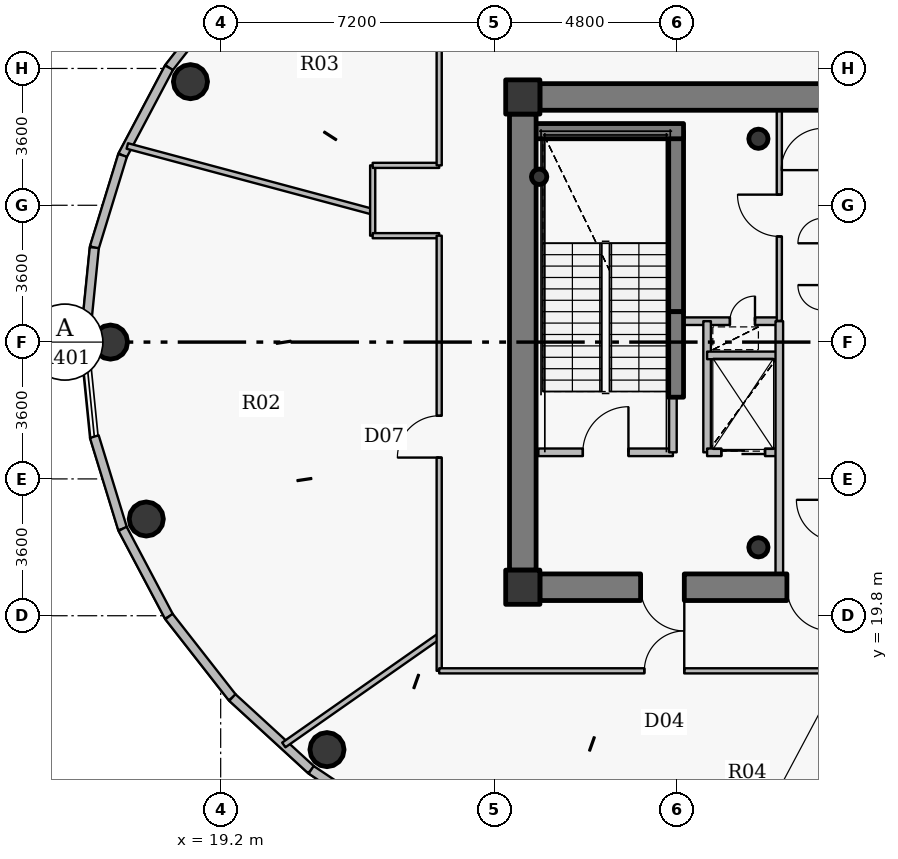
"""IFC4 building model, lengths in metres.
Left out: names, types, materials, properties, quantities, classifications, styles, units other than length and angle.
Written with IfcOpenShell. Run it as: python <this file> out.ifc"""

import sys

from ifc_helpers import new_model, si_unit, direction, frame, frame_2d, origin, origin_2d, place, context, subcontext, project, spatial, rectangle, hollow_circle, extrude, source, transform, mapped, element, fill, save


model = new_model("IFC4")
c1 = context("Model", 3, precision=1e-05, world=origin(), true_north=direction((0.0, 1.0)))
c2 = subcontext(c1, "Body", "Model", "MODEL_VIEW")
j1 = project(units=[si_unit("LENGTHUNIT", "METRE"), si_unit("PLANEANGLEUNIT", "RADIAN")], contexts=[c1])
p1 = place(None, origin())
s1 = spatial("IfcSite", under=j1, at=p1, CompositionType="ELEMENT")
p2 = place(p1, origin())
s2 = spatial("IfcBuilding", under=s1, at=p2, CompositionType="ELEMENT")
p3 = place(p2, frame((0.0, 0.0, 346.8)))
s3 = spatial("IfcBuildingStorey", under=s2, at=p3, CompositionType="ELEMENT", Elevation=346.8)
for number, where, z_axis, x_axis in (
    (1, (27.15, 20.55, 0.0), (0.0, 0.0, 1.0), (1.0, 0.0, 0.0)),
    (2, (27.15, 33.45, 0.0), (0.0, 0.0, 1.0), (1.0, 0.0, 0.0)),
):
    element("IfcColumn", number, at=place(p3, frame(where, z_axis=z_axis, x_axis=x_axis)), inside=s3, PredefinedType="COLUMN", context=c2, shape_type="SweptSolid", body=[
        extrude(rectangle(XDim=0.9, YDim=0.9, at=origin_2d()), origin(), (0.0, 0.0, 1.0), 4.2),
    ])
for number, where, z_axis, x_axis in (
    (3, (33.35, 21.6, 0.0), (0.0, 0.0, 1.0), (1.0, 0.0, 0.0)),
    (4, (33.35, 32.35, 0.0), (0.0, 0.0, 1.0), (1.0, 0.0, 0.0)),
):
    element("IfcColumn", number, at=place(p3, frame(where, z_axis=z_axis, x_axis=x_axis)), inside=s3, PredefinedType="COLUMN", context=c2, shape_type="SweptSolid", body=[
        extrude(hollow_circle(Radius=0.254, WallThickness=0.02, at=origin_2d()), origin(), (0.0, 0.0, 1.0), 4.2),
    ])
p4 = place(p3, frame((31.18, 27.8, 0.0), z_axis=(0.0, 0.0, 1.0), x_axis=(0.0, 1.0, 0.0)))
e5 = element("IfcWall", 5, at=p4, inside=s3, PredefinedType="SHEAR", context=c2, shape_type="SweptSolid", body=[
    extrude(rectangle(XDim=4.75, YDim=0.4, at=frame_2d((2.375, 0.0))), origin(), (0.0, 0.0, 1.0), 4.2),
])
p5 = place(p3, frame((27.25, 32.55, 0.0), z_axis=(0.0, 0.0, 1.0), x_axis=(1.0, 0.0, 0.0)))
e6 = element("IfcWall", 6, at=p5, inside=s3, PredefinedType="SHEAR", context=c2, shape_type="SweptSolid", body=[
    extrude(rectangle(XDim=4.13, YDim=0.4, at=frame_2d((2.065, 0.0))), origin(), (0.0, 0.0, 1.0), 4.2),
])
p6 = place(p3, frame((27.58, 31.35, 0.0), z_axis=(0.0, 0.0, 1.0), x_axis=(1.0, 0.0, 0.0)))
e7 = element("IfcColumn", 7, at=p6, inside=s3, PredefinedType="COLUMN", context=c2, shape_type="SweptSolid", body=[
    extrude(hollow_circle(Radius=0.203, WallThickness=0.016, at=origin_2d()), origin(), (0.0, 0.0, 1.0), 4.2),
])
p7 = place(p3, frame((27.6, 33.45, 0.0), z_axis=(0.0, 0.0, 1.0), x_axis=(1.0, 0.0, 0.0)))
e8 = element("IfcWall", 8, at=p7, inside=s3, PredefinedType="SHEAR", context=c2, shape_type="SweptSolid", body=[
    extrude(rectangle(XDim=16.8, YDim=0.7, at=frame_2d((8.4, 0.0))), origin(), (0.0, 0.0, 1.0), 3.45),
])
p8 = place(p7, frame((12.85, 0.0, 0.0)))
e9 = element("IfcOpeningElement", 9, at=p8, cuts=e8, PredefinedType="OPENING", context=c2, shape_type="SweptSolid", body=[
    extrude(rectangle(XDim=1.15, YDim=2.15, at=origin_2d()), frame((0.575, 0.36, 1.075), z_axis=(0.0, -1.0, 0.0), x_axis=(1.0, 0.0, 0.0)), (0.0, 0.0, 1.0), 0.72),
])
p9 = place(p3, frame((44.4, 20.55, 0.0), z_axis=(0.0, 0.0, 1.0), x_axis=(-1.0, 0.0, 0.0)))
e10 = element("IfcWall", 10, at=p9, inside=s3, PredefinedType="SHEAR", context=c2, shape_type="SweptSolid", body=[
    extrude(rectangle(XDim=16.8, YDim=0.7, at=frame_2d((8.4, 0.0))), origin(), (0.0, 0.0, 1.0), 3.45),
])
p10 = place(p9, frame((13.0, 0.0, 0.0)))
e11 = element("IfcOpeningElement", 11, at=p10, cuts=e10, PredefinedType="OPENING", context=c2, shape_type="SweptSolid", body=[
    extrude(rectangle(XDim=1.15, YDim=2.15, at=origin_2d()), frame((0.575, 0.36, 1.075), z_axis=(0.0, -1.0, 0.0), x_axis=(1.0, 0.0, 0.0)), (0.0, 0.0, 1.0), 0.72),
])
p11 = place(p9, frame((9.15, 0.0, 0.0)))
e12 = element("IfcOpeningElement", 12, at=p11, cuts=e10, PredefinedType="OPENING", context=c2, shape_type="SweptSolid", body=[
    extrude(rectangle(XDim=1.15, YDim=2.15, at=origin_2d()), frame((0.575, 0.36, 1.075), z_axis=(0.0, -1.0, 0.0), x_axis=(1.0, 0.0, 0.0)), (0.0, 0.0, 1.0), 0.72),
])
p12 = place(p3, frame((27.15, 21.0, 0.0), z_axis=(0.0, 0.0, 1.0), x_axis=(0.0, 1.0, 0.0)))
e13 = element("IfcWall", 13, at=p12, inside=s3, PredefinedType="SHEAR", context=c2, shape_type="SweptSolid", body=[
    extrude(rectangle(XDim=12.0, YDim=0.7, at=frame_2d((6.0, 0.0))), origin(), (0.0, 0.0, 1.0), 3.45),
])
p13 = place(p3, frame((31.18, 25.55, 0.0), z_axis=(0.0, 0.0, 1.0), x_axis=(0.0, 1.0, 0.0)))
e14 = element("IfcWall", 14, at=p13, inside=s3, PredefinedType="SHEAR", context=c2, shape_type="SweptSolid", body=[
    extrude(rectangle(XDim=2.25, YDim=0.4, at=frame_2d((1.125, 0.0))), origin(), (0.0, 0.0, 1.0), 3.5),
])
for number, where, z_axis, x_axis in (
    (15, (18.405, 33.853, 0.0), (0.0, 0.0, 1.0), (1.0, 0.0, 0.0)),
    (16, (16.3, 27.0, 0.0), (0.0, 0.0, 1.0), (1.0, 0.0, 0.0)),
    (17, (17.242, 22.345, 0.0), (0.0, 0.0, 1.0), (1.0, 0.0, 0.0)),
    (18, (21.998, 16.277, 0.0), (0.0, 0.0, 1.0), (1.0, 0.0, 0.0)),
):
    element("IfcColumn", number, at=place(p3, frame(where, z_axis=z_axis, x_axis=x_axis)), inside=s3, PredefinedType="COLUMN", context=c2, shape_type="SweptSolid", body=[
        extrude(hollow_circle(Radius=0.45, WallThickness=0.028, at=origin_2d()), origin(), (0.0, 0.0, 1.0), 4.2),
    ])
p14 = place(p3, frame((17.839, 34.221, 0.0), z_axis=(0.0, 0.0, 1.0), x_axis=(0.616286367698, 0.78752213492, 0.0)))
e19 = element("IfcWall", 19, at=p14, inside=s3, PredefinedType="SOLIDWALL", context=c2, shape_type="SweptSolid", body=[
    extrude(rectangle(XDim=2.706, YDim=0.24, at=frame_2d((1.353, 0.0))), origin(), (0.0, 0.0, 1.0), 3.9),
])
p15 = place(p3, frame((16.619, 31.913, 0.0), z_axis=(0.0, 0.0, 1.0), x_axis=(0.467487999989, 0.883999417345, 0.0)))
e20 = element("IfcWall", 20, at=p15, inside=s3, PredefinedType="SOLIDWALL", context=c2, shape_type="SweptSolid", body=[
    extrude(rectangle(XDim=2.61, YDim=0.24, at=frame_2d((1.305, 0.0))), origin(), (0.0, 0.0, 1.0), 3.9),
])
p16 = place(p3, frame((15.875, 29.487, 0.0), z_axis=(0.0, 0.0, 1.0), x_axis=(0.293105547213, 0.956080089842, 0.0)))
e21 = element("IfcWall", 21, at=p16, inside=s3, PredefinedType="SOLIDWALL", context=c2, shape_type="SweptSolid", body=[
    extrude(rectangle(XDim=2.538, YDim=0.24, at=frame_2d((1.269, 0.0))), origin(), (0.0, 0.0, 1.0), 3.9),
])
p17 = place(p3, frame((15.625, 27.0, 0.0), z_axis=(0.0, 0.0, 1.0), x_axis=(0.100025963401, 0.994984827344, 0.0)))
e22 = element("IfcWall", 22, at=p17, inside=s3, PredefinedType="SOLIDWALL", context=c2, shape_type="SweptSolid", body=[
    extrude(rectangle(XDim=2.499, YDim=0.24, at=frame_2d((1.25, 0.0))), origin(), (0.0, 0.0, 1.0), 3.9),
])
p18 = place(p3, frame((16.619, 22.087, 0.0), z_axis=(0.0, 0.0, 1.0), x_axis=(-0.293105547213, 0.956080089842, 0.0)))
e23 = element("IfcWall", 23, at=p18, inside=s3, PredefinedType="SOLIDWALL", context=c2, shape_type="SweptSolid", body=[
    extrude(rectangle(XDim=2.538, YDim=0.24, at=frame_2d((1.269, 0.0))), origin(), (0.0, 0.0, 1.0), 3.9),
])
p19 = place(p3, frame((17.839, 19.779, 0.0), z_axis=(0.0, 0.0, 1.0), x_axis=(-0.467487999989, 0.883999417345, 0.0)))
e24 = element("IfcWall", 24, at=p19, inside=s3, PredefinedType="SOLIDWALL", context=c2, shape_type="SweptSolid", body=[
    extrude(rectangle(XDim=2.61, YDim=0.24, at=frame_2d((1.305, 0.0))), origin(), (0.0, 0.0, 1.0), 3.9),
])
p20 = place(p3, frame((19.507, 17.648, 0.0), z_axis=(0.0, 0.0, 1.0), x_axis=(-0.616286367698, 0.78752213492, 0.0)))
e25 = element("IfcWall", 25, at=p20, inside=s3, PredefinedType="SOLIDWALL", context=c2, shape_type="SweptSolid", body=[
    extrude(rectangle(XDim=2.706, YDim=0.24, at=frame_2d((1.353, 0.0))), origin(), (0.0, 0.0, 1.0), 3.9),
])
p21 = place(p3, frame((21.581, 15.746, 0.0), z_axis=(0.0, 0.0, 1.0), x_axis=(-0.737020907932, 0.675869944051, 0.0)))
e26 = element("IfcWall", 26, at=p21, inside=s3, PredefinedType="SOLIDWALL", context=c2, shape_type="SweptSolid", body=[
    extrude(rectangle(XDim=2.815, YDim=0.24, at=frame_2d((1.407, 0.0))), origin(), (0.0, 0.0, 1.0), 3.9),
])
p22 = place(p3, frame((24.012, 14.12, 0.0), z_axis=(0.0, 0.0, 1.0), x_axis=(-0.831201688654, 0.555970999944, 0.0)))
e27 = element("IfcWall", 27, at=p22, inside=s3, PredefinedType="SOLIDWALL", context=c2, shape_type="SweptSolid", body=[
    extrude(rectangle(XDim=2.925, YDim=0.24, at=frame_2d((1.462, 0.0))), origin(), (0.0, 0.0, 1.0), 3.9),
])
p23 = place(p22, frame((0.837, 0.0, 0.9)))
e28 = element("IfcOpeningElement", 28, at=p23, cuts=e27, PredefinedType="OPENING", context=c2, shape_type="SweptSolid", body=[
    extrude(rectangle(XDim=1.25, YDim=1.65, at=origin_2d()), frame((0.625, 0.13, 0.825), z_axis=(0.0, -1.0, 0.0), x_axis=(1.0, 0.0, 0.0)), (0.0, 0.0, 1.0), 0.26),
])
p24 = place(p3, frame((16.743, 32.16, 0.0), z_axis=(0.0, 0.0, 1.0), x_axis=(0.965927509529, -0.258812763084, 0.0)))
e29 = element("IfcWall", 29, at=p24, inside=s3, PredefinedType="PARTITIONING", context=c2, shape_type="SweptSolid", body=[
    extrude(rectangle(XDim=6.684, YDim=0.15, at=frame_2d((3.342, 0.0))), origin(), (0.0, 0.0, 1.0), 3.385),
])
p25 = place(p3, frame((20.861, 16.4, 0.0), z_axis=(0.0, 0.0, 1.0), x_axis=(0.81915378735, 0.573573946994, 0.0)))
e30 = element("IfcWall", 30, at=p25, inside=s3, PredefinedType="PARTITIONING", context=c2, shape_type="SweptSolid", body=[
    extrude(rectangle(XDim=4.991, YDim=0.15, at=frame_2d((2.496, 0.0))), origin(), (0.0, 0.0, 1.0), 3.385),
])
p26 = place(p3, frame((23.2, 29.8, 0.0), z_axis=(0.0, 0.0, 1.0), x_axis=(0.0, 1.0, 0.0)))
e31 = element("IfcWall", 31, at=p26, inside=s3, PredefinedType="PARTITIONING", context=c2, shape_type="SweptSolid", body=[
    extrude(rectangle(XDim=1.85, YDim=0.135, at=frame_2d((0.925, 0.0))), origin(), (0.0, 0.0, 1.0), 3.9),
])
p27 = place(p3, frame((23.2, 29.8, 0.0), z_axis=(0.0, 0.0, 1.0), x_axis=(1.0, 0.0, 0.0)))
e32 = element("IfcWall", 32, at=p27, inside=s3, PredefinedType="PARTITIONING", context=c2, shape_type="SweptSolid", body=[
    extrude(rectangle(XDim=1.75, YDim=0.135, at=frame_2d((0.875, 0.0))), origin(), (0.0, 0.0, 1.0), 3.9),
])
p28 = place(p3, frame((23.2, 31.65, 0.0), z_axis=(0.0, 0.0, 1.0), x_axis=(1.0, 0.0, 0.0)))
e33 = element("IfcWall", 33, at=p28, inside=s3, PredefinedType="PARTITIONING", context=c2, shape_type="SweptSolid", body=[
    extrude(rectangle(XDim=1.75, YDim=0.135, at=frame_2d((0.875, 0.0))), origin(), (0.0, 0.0, 1.0), 2.685),
])
p29 = place(p3, frame((24.95, 18.35, 0.0), z_axis=(0.0, 0.0, 1.0), x_axis=(0.0, 1.0, 0.0)))
e34 = element("IfcWall", 34, at=p29, inside=s3, PredefinedType="PARTITIONING", context=c2, shape_type="SweptSolid", body=[
    extrude(rectangle(XDim=11.45, YDim=0.135, at=frame_2d((5.725, 0.0))), origin(), (0.0, 0.0, 1.0), 2.685),
])
p30 = place(p29, frame((5.611, 0.0, 0.0)))
e35 = element("IfcOpeningElement", 35, at=p30, cuts=e34, PredefinedType="OPENING", context=c2, shape_type="SweptSolid", body=[
    extrude(rectangle(XDim=1.1, YDim=2.15, at=origin_2d()), frame((0.55, 0.078, 1.075), z_axis=(0.0, -1.0, 0.0), x_axis=(1.0, 0.0, 0.0)), (0.0, 0.0, 1.0), 0.155),
])
p31 = place(p3, frame((24.95, 18.35, 0.0), z_axis=(0.0, 0.0, 1.0), x_axis=(1.0, 0.0, 0.0)))
e36 = element("IfcWall", 36, at=p31, inside=s3, PredefinedType="PARTITIONING", context=c2, shape_type="SweptSolid", body=[
    extrude(rectangle(XDim=21.195, YDim=0.135, at=frame_2d((10.597, 0.0))), origin(), (0.0, 0.0, 1.0), 2.685),
])
p32 = place(p31, frame((5.398, 0.0, 0.0)))
e37 = element("IfcOpeningElement", 37, at=p32, cuts=e36, PredefinedType="OPENING", context=c2, shape_type="SweptSolid", body=[
    extrude(rectangle(XDim=1.05, YDim=2.15, at=origin_2d()), frame((0.525, 0.078, 1.075), z_axis=(0.0, -1.0, 0.0), x_axis=(1.0, 0.0, 0.0)), (0.0, 0.0, 1.0), 0.155),
])
p33 = place(p31, frame((13.318, 0.0, 0.0)))
e38 = element("IfcOpeningElement", 38, at=p33, cuts=e36, PredefinedType="OPENING", context=c2, shape_type="SweptSolid", body=[
    extrude(rectangle(XDim=0.82, YDim=2.1, at=origin_2d()), frame((0.41, 0.078, 1.05), z_axis=(0.0, -1.0, 0.0), x_axis=(1.0, 0.0, 0.0)), (0.0, 0.0, 1.0), 0.155),
])
p34 = place(p31, frame((17.992, 0.0, 0.0)))
e39 = element("IfcOpeningElement", 39, at=p34, cuts=e36, PredefinedType="OPENING", context=c2, shape_type="SweptSolid", body=[
    extrude(rectangle(XDim=0.82, YDim=2.1, at=origin_2d()), frame((0.41, 0.078, 1.05), z_axis=(0.0, -1.0, 0.0), x_axis=(1.0, 0.0, 0.0)), (0.0, 0.0, 1.0), 0.155),
])
p35 = place(p3, frame((24.95, 31.65, 0.0), z_axis=(0.0, 0.0, 1.0), x_axis=(0.0, 1.0, 0.0)))
e40 = element("IfcWall", 40, at=p35, inside=s3, PredefinedType="PARTITIONING", context=c2, shape_type="SweptSolid", body=[
    extrude(rectangle(XDim=4.0, YDim=0.135, at=frame_2d((2.0, 0.0))), origin(), (0.0, 0.0, 1.0), 2.685),
])
p36 = place(p3, frame((27.56, 24.1, 0.0), z_axis=(0.0, 0.0, 1.0), x_axis=(1.0, 0.0, 0.0)))
e41 = element("IfcWall", 41, at=p36, inside=s3, PredefinedType="PARTITIONING", context=c2, shape_type="SweptSolid", body=[
    extrude(rectangle(XDim=3.54, YDim=0.2, at=frame_2d((1.77, 0.0))), origin(), (0.0, 0.0, 1.0), 3.9),
])
p37 = place(p36, frame((1.17, 0.0, 0.0)))
e42 = element("IfcOpeningElement", 42, at=p37, cuts=e41, PredefinedType="OPENING", context=c2, shape_type="SweptSolid", body=[
    extrude(rectangle(XDim=1.2, YDim=2.15, at=origin_2d()), frame((0.6, 0.11, 1.075), z_axis=(0.0, -1.0, 0.0), x_axis=(1.0, 0.0, 0.0)), (0.0, 0.0, 1.0), 0.22),
])
p38 = place(p3, frame((31.1, 24.1, 0.0), z_axis=(0.0, 0.0, 1.0), x_axis=(0.0, 1.0, 0.0)))
e43 = element("IfcWall", 43, at=p38, inside=s3, PredefinedType="PARTITIONING", context=c2, shape_type="SweptSolid", body=[
    extrude(rectangle(XDim=1.44, YDim=0.2, at=frame_2d((0.72, 0.0))), origin(), (0.0, 0.0, 1.0), 3.9),
])
p39 = place(p3, frame((31.1, 27.55, 0.0), z_axis=(0.0, 0.0, 1.0), x_axis=(1.0, 0.0, 0.0)))
e44 = element("IfcWall", 44, at=p39, inside=s3, PredefinedType="PARTITIONING", context=c2, shape_type="SweptSolid", body=[
    extrude(rectangle(XDim=2.8, YDim=0.2, at=frame_2d((1.4, 0.0))), origin(), (0.0, 0.0, 1.0), 3.485),
])
p40 = place(p39, frame((1.5, 0.0, 0.0)))
e45 = element("IfcOpeningElement", 45, at=p40, cuts=e44, PredefinedType="OPENING", context=c2, shape_type="SweptSolid", body=[
    extrude(rectangle(XDim=0.66, YDim=2.05, at=origin_2d()), frame((0.33, 0.11, 1.025), z_axis=(0.0, -1.0, 0.0), x_axis=(1.0, 0.0, 0.0)), (0.0, 0.0, 1.0), 0.22),
])
p41 = place(p3, frame((32.0, 24.1, 0.0), z_axis=(0.0, 0.0, 1.0), x_axis=(0.0, 1.0, 0.0)))
e46 = element("IfcWall", 46, at=p41, inside=s3, PredefinedType="PARTITIONING", context=c2, shape_type="SweptSolid", body=[
    extrude(rectangle(XDim=3.45, YDim=0.2, at=frame_2d((1.725, 0.0))), origin(), (0.0, 0.0, 1.0), 3.9),
])
p42 = place(p3, frame((32.0, 24.1, 0.0), z_axis=(0.0, 0.0, 1.0), x_axis=(1.0, 0.0, 0.0)))
e47 = element("IfcWall", 47, at=p42, inside=s3, PredefinedType="PARTITIONING", context=c2, shape_type="SweptSolid", body=[
    extrude(rectangle(XDim=1.9, YDim=0.2, at=frame_2d((0.95, 0.0))), origin(), (0.0, 0.0, 1.0), 3.485),
])
p43 = place(p42, frame((0.375, 0.0, 0.0)))
e48 = element("IfcOpeningElement", 48, at=p43, cuts=e47, PredefinedType="OPENING", context=c2, shape_type="SweptSolid", body=[
    extrude(rectangle(XDim=1.15, YDim=2.15, at=origin_2d()), frame((0.575, 0.11, 1.075), z_axis=(0.0, -1.0, 0.0), x_axis=(1.0, 0.0, 0.0)), (0.0, 0.0, 1.0), 0.22),
])
p44 = place(p3, frame((32.0, 26.65, 0.0), z_axis=(0.0, 0.0, 1.0), x_axis=(1.0, 0.0, 0.0)))
e49 = element("IfcWall", 49, at=p44, inside=s3, PredefinedType="PARTITIONING", context=c2, shape_type="SweptSolid", body=[
    extrude(rectangle(XDim=1.9, YDim=0.2, at=frame_2d((0.95, 0.0))), origin(), (0.0, 0.0, 1.0), 3.485),
])
p45 = place(p3, frame((33.9, 20.9, 0.0), z_axis=(0.0, 0.0, 1.0), x_axis=(0.0, 1.0, 0.0)))
e50 = element("IfcWall", 50, at=p45, inside=s3, PredefinedType="PARTITIONING", context=c2, shape_type="SweptSolid", body=[
    extrude(rectangle(XDim=6.65, YDim=0.2, at=frame_2d((3.325, 0.0))), origin(), (0.0, 0.0, 1.0), 3.485),
])
p46 = place(p3, frame((33.9, 27.56, 0.0), z_axis=(0.0, 0.0, 1.0), x_axis=(0.0, 1.0, 0.0)))
e51 = element("IfcWall", 51, at=p46, inside=s3, PredefinedType="PARTITIONING", context=c2, shape_type="SweptSolid", body=[
    extrude(rectangle(XDim=5.54, YDim=0.135, at=frame_2d((2.77, 0.0))), origin(), (0.0, 0.0, 1.0), 3.485),
])
p47 = place(p46, frame((2.22, 0.0, 0.0)))
e52 = element("IfcOpeningElement", 52, at=p47, cuts=e51, PredefinedType="OPENING", context=c2, shape_type="SweptSolid", body=[
    extrude(rectangle(XDim=1.1, YDim=2.15, at=origin_2d()), frame((0.55, 0.078, 1.075), z_axis=(0.0, -1.0, 0.0), x_axis=(1.0, 0.0, 0.0)), (0.0, 0.0, 1.0), 0.155),
])
p48 = place(p3, frame((27.59, 33.8, 0.0), z_axis=(0.0, 0.0, 1.0), x_axis=(-1.0, 0.0, 0.0)))
e53 = element("IfcWall", 53, at=p48, inside=s3, PredefinedType="PARTITIONING", context=c2, shape_type="SweptSolid", body=[
    extrude(rectangle(XDim=0.79, YDim=0.135, at=frame_2d((0.395, 0.0))), origin(), (0.0, 0.0, 1.0), 2.685),
])
p49 = place(p3, frame((26.8, 33.492, 0.0), z_axis=(0.0, 0.0, 1.0), x_axis=(0.0, -1.0, 0.0)))
e54 = element("IfcWall", 54, at=p49, inside=s3, PredefinedType="PARTITIONING", context=c2, shape_type="SweptSolid", body=[
    extrude(rectangle(XDim=0.482, YDim=0.135, at=frame_2d((0.241, 0.0))), origin(), (0.0, 0.0, 1.0), 3.9),
])
p50 = place(p3, frame((26.8, 20.99, 0.0), z_axis=(0.0, 0.0, 1.0), x_axis=(0.0, -1.0, 0.0)))
e55 = element("IfcWall", 55, at=p50, inside=s3, PredefinedType="PARTITIONING", context=c2, shape_type="SweptSolid", body=[
    extrude(rectangle(XDim=0.79, YDim=0.135, at=frame_2d((0.395, 0.0))), origin(), (0.0, 0.0, 1.0), 2.685),
])
p51 = place(p3, frame((27.107, 20.2, 0.0), z_axis=(0.0, 0.0, 1.0), x_axis=(1.0, 0.0, 0.0)))
e56 = element("IfcWall", 56, at=p51, inside=s3, PredefinedType="PARTITIONING", context=c2, shape_type="SweptSolid", body=[
    extrude(rectangle(XDim=0.483, YDim=0.135, at=frame_2d((0.241, 0.0))), origin(), (0.0, 0.0, 1.0), 2.685),
])
m1 = source(origin(), c2, "Body", "SweptSolid", [
    extrude(rectangle(XDim=1.15, YDim=2.15, at=origin_2d()), frame((0.575, 0.025, 1.075), z_axis=(0.0, -1.0, 0.0), x_axis=(1.0, 0.0, 0.0)), (0.0, 0.0, 1.0), 0.05),
])
p52 = place(p10, origin())
e57 = element("IfcDoor", 57, at=p52, inside=s3, OperationType="SINGLE_SWING_LEFT", PredefinedType="DOOR", context=c2, shape_type="MappedRepresentation", body=[
    mapped(m1, transform((0.0, 0.0, 0.0), x_axis=(1.0, 0.0, 0.0), y_axis=(0.0, 1.0, 0.0), z_axis=(0.0, 0.0, 1.0), scale=1.0)),
])
fill(e11, e57)
p53 = place(p11, origin())
e58 = element("IfcDoor", 58, at=p53, inside=s3, OperationType="SINGLE_SWING_LEFT", PredefinedType="DOOR", context=c2, shape_type="MappedRepresentation", body=[
    mapped(m1, transform((0.0, 0.0, 0.0), x_axis=(1.0, 0.0, 0.0), y_axis=(0.0, 1.0, 0.0), z_axis=(0.0, 0.0, 1.0), scale=1.0)),
])
fill(e12, e58)
m2 = source(origin(), c2, "Body", "SweptSolid", [
    extrude(rectangle(XDim=1.2, YDim=2.15, at=origin_2d()), frame((0.6, 0.025, 1.075), z_axis=(0.0, -1.0, 0.0), x_axis=(1.0, 0.0, 0.0)), (0.0, 0.0, 1.0), 0.05),
])
p54 = place(p37, origin())
e59 = element("IfcDoor", 59, at=p54, inside=s3, OperationType="SINGLE_SWING_RIGHT", PredefinedType="DOOR", context=c2, shape_type="MappedRepresentation", body=[
    mapped(m2, transform((0.0, 0.0, 0.0), x_axis=(1.0, 0.0, 0.0), y_axis=(0.0, 1.0, 0.0), z_axis=(0.0, 0.0, 1.0), scale=1.0)),
])
fill(e42, e59)
m3 = source(origin(), c2, "Body", "SweptSolid", [
    extrude(rectangle(XDim=1.15, YDim=2.15, at=origin_2d()), frame((0.575, 0.025, 1.075), z_axis=(0.0, -1.0, 0.0), x_axis=(1.0, 0.0, 0.0)), (0.0, 0.0, 1.0), 0.05),
])
p55 = place(p43, origin())
e60 = element("IfcDoor", 60, at=p55, inside=s3, OperationType="DOUBLE_DOOR_SLIDING", PredefinedType="USERDEFINED", context=c2, shape_type="MappedRepresentation", body=[
    mapped(m3, transform((0.0, 0.0, 0.0), x_axis=(1.0, 0.0, 0.0), y_axis=(0.0, 1.0, 0.0), z_axis=(0.0, 0.0, 1.0), scale=1.0)),
])
fill(e48, e60)
m4 = source(origin(), c2, "Body", "SweptSolid", [
    extrude(rectangle(XDim=1.1, YDim=2.15, at=origin_2d()), frame((0.55, 0.025, 1.075), z_axis=(0.0, -1.0, 0.0), x_axis=(1.0, 0.0, 0.0)), (0.0, 0.0, 1.0), 0.05),
])
p56 = place(p47, origin())
e61 = element("IfcDoor", 61, at=p56, inside=s3, OperationType="SINGLE_SWING_RIGHT", PredefinedType="DOOR", context=c2, shape_type="MappedRepresentation", body=[
    mapped(m4, transform((0.0, 0.0, 0.0), x_axis=(1.0, 0.0, 0.0), y_axis=(0.0, 1.0, 0.0), z_axis=(0.0, 0.0, 1.0), scale=1.0)),
])
fill(e52, e61)
p57 = place(p30, origin())
e62 = element("IfcDoor", 62, at=p57, inside=s3, OperationType="SINGLE_SWING_LEFT", PredefinedType="DOOR", context=c2, shape_type="MappedRepresentation", body=[
    mapped(m4, transform((0.0, 0.0, 0.0), x_axis=(1.0, 0.0, 0.0), y_axis=(0.0, 1.0, 0.0), z_axis=(0.0, 0.0, 1.0), scale=1.0)),
])
fill(e35, e62)
m5 = source(origin(), c2, "Body", "SweptSolid", [
    extrude(rectangle(XDim=1.05, YDim=2.15, at=origin_2d()), frame((0.525, 0.025, 1.075), z_axis=(0.0, -1.0, 0.0), x_axis=(1.0, 0.0, 0.0)), (0.0, 0.0, 1.0), 0.05),
])
p58 = place(p32, origin())
e63 = element("IfcDoor", 63, at=p58, inside=s3, OperationType="SINGLE_SWING_RIGHT", PredefinedType="DOOR", context=c2, shape_type="MappedRepresentation", body=[
    mapped(m5, transform((0.0, 0.0, 0.0), x_axis=(1.0, 0.0, 0.0), y_axis=(0.0, 1.0, 0.0), z_axis=(0.0, 0.0, 1.0), scale=1.0)),
])
fill(e37, e63)
m6 = source(origin(), c2, "Body", "SweptSolid", [
    extrude(rectangle(XDim=0.66, YDim=2.05, at=origin_2d()), frame((0.33, 0.025, 1.025), z_axis=(0.0, -1.0, 0.0), x_axis=(1.0, 0.0, 0.0)), (0.0, 0.0, 1.0), 0.05),
])
p59 = place(p40, origin())
e64 = element("IfcDoor", 64, at=p59, inside=s3, OperationType="SINGLE_SWING_RIGHT", PredefinedType="USERDEFINED", context=c2, shape_type="MappedRepresentation", body=[
    mapped(m6, transform((0.0, 0.0, 0.0), x_axis=(1.0, 0.0, 0.0), y_axis=(0.0, 1.0, 0.0), z_axis=(0.0, 0.0, 1.0), scale=1.0)),
])
fill(e45, e64)
save(model, sys.argv[1])
